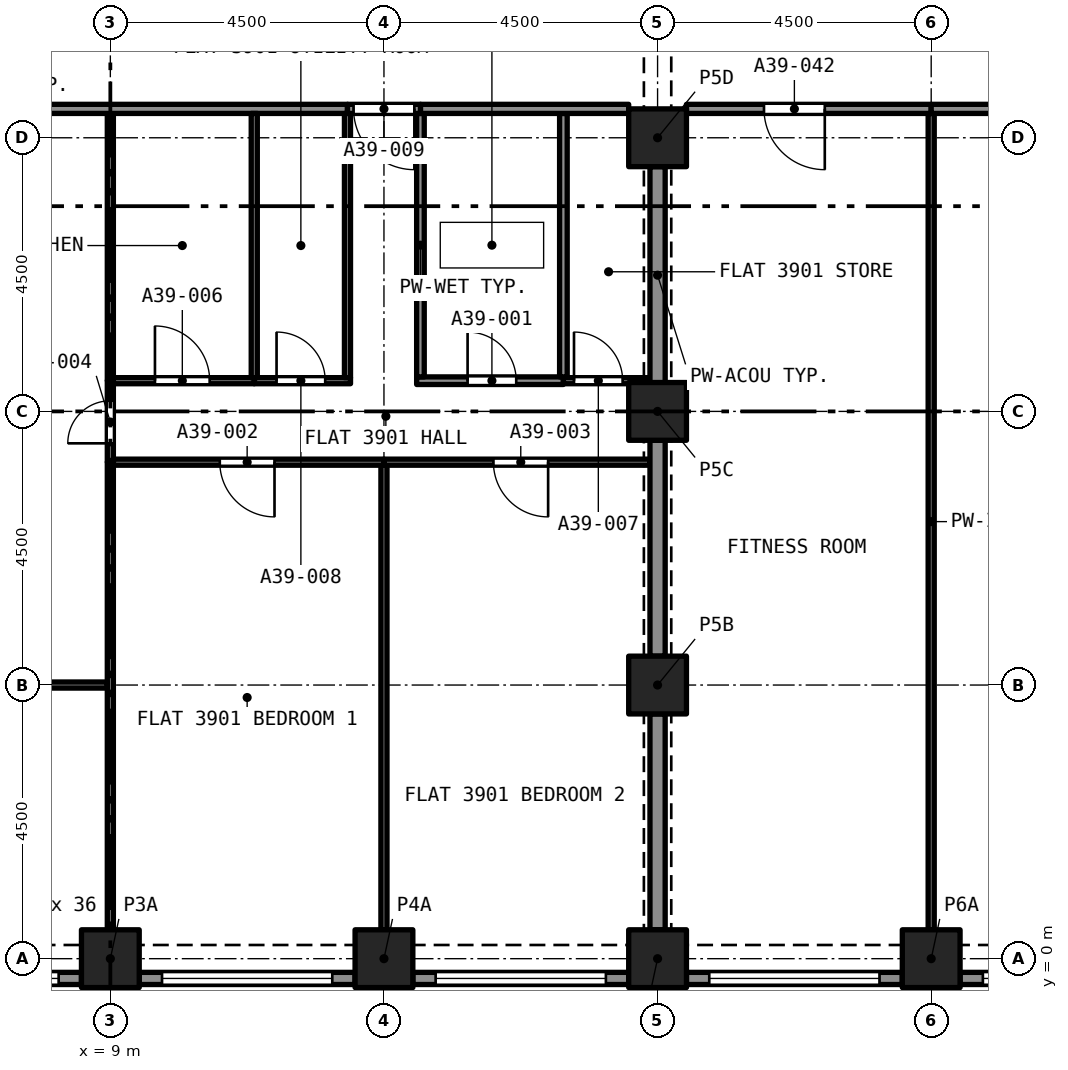
"""IFC4 building model, lengths in metres.
Left out: names, types, materials, properties, quantities, classifications, styles, units other than length and angle.
Written with IfcOpenShell. Run it as: python <this file> out.ifc"""

import sys

from ifc_helpers import new_model, si_unit, direction, frame, frame_2d, origin, origin_2d, place, context, subcontext, project, spatial, rectangle, extrude, element, fill, save


model = new_model("IFC4")
c1 = context("Model", 3, precision=1e-05, world=origin(), true_north=direction((0.0, 1.0)))
c2 = subcontext(c1, "Body", "Model", "MODEL_VIEW")
j1 = project(units=[si_unit("LENGTHUNIT", "METRE"), si_unit("PLANEANGLEUNIT", "RADIAN")], contexts=[c1])
p1 = place(None, origin())
s1 = spatial("IfcSite", under=j1, at=p1, CompositionType="ELEMENT")
p2 = place(p1, origin())
s2 = spatial("IfcBuilding", under=s1, at=p2, CompositionType="ELEMENT")
p3 = place(p2, frame((0.0, 0.0, 139.8)))
s3 = spatial("IfcBuildingStorey", under=s2, at=p3, CompositionType="ELEMENT", Elevation=139.8)
for number, where, z_axis, x_axis in (
    (1, (9.0, 0.0, 0.0), (0.0, 0.0, 1.0), (1.0, 0.0, 0.0)),
    (2, (13.5, 0.0, 0.0), (0.0, 0.0, 1.0), (1.0, 0.0, 0.0)),
    (3, (18.0, 0.0, 0.0), (0.0, 0.0, 1.0), (1.0, 0.0, 0.0)),
    (4, (22.5, 0.0, 0.0), (0.0, 0.0, 1.0), (1.0, 0.0, 0.0)),
    (5, (18.0, 4.5, 0.0), (0.0, 0.0, 1.0), (1.0, 0.0, 0.0)),
    (6, (18.0, 9.0, 0.0), (0.0, 0.0, 1.0), (1.0, 0.0, 0.0)),
    (7, (18.0, 13.5, 0.0), (0.0, 0.0, 1.0), (1.0, 0.0, 0.0)),
):
    element("IfcColumn", number, at=place(p3, frame(where, z_axis=z_axis, x_axis=x_axis)), inside=s3, PredefinedType="COLUMN", context=c2, shape_type="SweptSolid", body=[
        extrude(rectangle(XDim=0.95, YDim=0.95, at=origin_2d()), origin(), (0.0, 0.0, 1.0), 3.2),
    ])
p4 = place(p3, frame((8.525, -0.325, 0.0), z_axis=(0.0, 0.0, 1.0), x_axis=(-1.0, 0.0, 0.0)))
e8 = element("IfcWall", 8, at=p4, inside=s3, PredefinedType="SOLIDWALL", context=c2, shape_type="SweptSolid", body=[
    extrude(rectangle(XDim=3.55, YDim=0.2, at=frame_2d((1.775, 0.0))), origin(), (0.0, 0.0, 1.0), 3.2),
])
p5 = place(p4, frame((0.375, 0.0, 0.45)))
e9 = element("IfcOpeningElement", 9, at=p5, cuts=e8, PredefinedType="OPENING", context=c2, shape_type="SweptSolid", body=[
    extrude(rectangle(XDim=2.8, YDim=1.95, at=frame_2d((1.4, 0.975))), frame((0.0, 0.11, 0.0), z_axis=(0.0, -1.0, 0.0), x_axis=(1.0, 0.0, 0.0)), (0.0, 0.0, 1.0), 0.22),
])
p6 = place(p3, frame((13.025, -0.325, 0.0), z_axis=(0.0, 0.0, 1.0), x_axis=(-1.0, 0.0, 0.0)))
e10 = element("IfcWall", 10, at=p6, inside=s3, PredefinedType="SOLIDWALL", context=c2, shape_type="SweptSolid", body=[
    extrude(rectangle(XDim=3.55, YDim=0.2, at=frame_2d((1.775, 0.0))), origin(), (0.0, 0.0, 1.0), 3.2),
])
p7 = place(p6, frame((0.375, 0.0, 0.45)))
e11 = element("IfcOpeningElement", 11, at=p7, cuts=e10, PredefinedType="OPENING", context=c2, shape_type="SweptSolid", body=[
    extrude(rectangle(XDim=2.8, YDim=1.95, at=frame_2d((1.4, 0.975))), frame((0.0, 0.11, 0.0), z_axis=(0.0, -1.0, 0.0), x_axis=(1.0, 0.0, 0.0)), (0.0, 0.0, 1.0), 0.22),
])
p8 = place(p3, frame((17.525, -0.325, 0.0), z_axis=(0.0, 0.0, 1.0), x_axis=(-1.0, 0.0, 0.0)))
e12 = element("IfcWall", 12, at=p8, inside=s3, PredefinedType="SOLIDWALL", context=c2, shape_type="SweptSolid", body=[
    extrude(rectangle(XDim=3.55, YDim=0.2, at=frame_2d((1.775, 0.0))), origin(), (0.0, 0.0, 1.0), 3.2),
])
p9 = place(p8, frame((0.375, 0.0, 0.45)))
e13 = element("IfcOpeningElement", 13, at=p9, cuts=e12, PredefinedType="OPENING", context=c2, shape_type="SweptSolid", body=[
    extrude(rectangle(XDim=2.8, YDim=1.95, at=frame_2d((1.4, 0.975))), frame((0.0, 0.11, 0.0), z_axis=(0.0, -1.0, 0.0), x_axis=(1.0, 0.0, 0.0)), (0.0, 0.0, 1.0), 0.22),
])
p10 = place(p3, frame((22.025, -0.325, 0.0), z_axis=(0.0, 0.0, 1.0), x_axis=(-1.0, 0.0, 0.0)))
e14 = element("IfcWall", 14, at=p10, inside=s3, PredefinedType="SOLIDWALL", context=c2, shape_type="SweptSolid", body=[
    extrude(rectangle(XDim=3.55, YDim=0.2, at=frame_2d((1.775, 0.0))), origin(), (0.0, 0.0, 1.0), 3.2),
])
p11 = place(p10, frame((0.375, 0.0, 0.45)))
e15 = element("IfcOpeningElement", 15, at=p11, cuts=e14, PredefinedType="OPENING", context=c2, shape_type="SweptSolid", body=[
    extrude(rectangle(XDim=2.8, YDim=1.95, at=frame_2d((1.4, 0.975))), frame((0.0, 0.11, 0.0), z_axis=(0.0, -1.0, 0.0), x_axis=(1.0, 0.0, 0.0)), (0.0, 0.0, 1.0), 0.22),
])
p12 = place(p3, frame((26.525, -0.325, 0.0), z_axis=(0.0, 0.0, 1.0), x_axis=(-1.0, 0.0, 0.0)))
e16 = element("IfcWall", 16, at=p12, inside=s3, PredefinedType="SOLIDWALL", context=c2, shape_type="SweptSolid", body=[
    extrude(rectangle(XDim=3.55, YDim=0.2, at=frame_2d((1.775, 0.0))), origin(), (0.0, 0.0, 1.0), 3.2),
])
p13 = place(p12, frame((0.375, 0.0, 0.45)))
e17 = element("IfcOpeningElement", 17, at=p13, cuts=e16, PredefinedType="OPENING", context=c2, shape_type="SweptSolid", body=[
    extrude(rectangle(XDim=2.8, YDim=1.95, at=frame_2d((1.4, 0.975))), frame((0.0, 0.11, 0.0), z_axis=(0.0, -1.0, 0.0), x_axis=(1.0, 0.0, 0.0)), (0.0, 0.0, 1.0), 0.22),
])
p14 = place(p3, frame((14.038, 9.505, 0.0), z_axis=(0.0, 0.0, 1.0), x_axis=(1.0, 0.0, 0.0)))
e18 = element("IfcWall", 18, at=p14, inside=s3, PredefinedType="PARTITIONING", context=c2, shape_type="SweptSolid", body=[
    extrude(rectangle(XDim=2.414, YDim=0.125, at=frame_2d((1.207, 0.0))), origin(), (0.0, 0.0, 1.0), 2.9),
])
p15 = place(p14, frame((0.838, 0.0, 0.0)))
e19 = element("IfcOpeningElement", 19, at=p15, cuts=e18, PredefinedType="OPENING", context=c2, shape_type="SweptSolid", body=[
    extrude(rectangle(XDim=0.8, YDim=2.1, at=frame_2d((0.4, 1.05))), frame((0.0, 0.073, 0.0), z_axis=(0.0, -1.0, 0.0), x_axis=(1.0, 0.0, 0.0)), (0.0, 0.0, 1.0), 0.145),
])
for number, where, z_axis, x_axis in (
    (20, (14.1, 9.567, 0.0), (0.0, 0.0, 1.0), (0.0, 1.0, 0.0)),
    (21, (16.451, 9.567, 0.0), (0.0, 0.0, 1.0), (0.0, 1.0, 0.0)),
):
    element("IfcWall", number, at=place(p3, frame(where, z_axis=z_axis, x_axis=x_axis)), inside=s3, PredefinedType="PARTITIONING", context=c2, shape_type="SweptSolid", body=[
        extrude(rectangle(XDim=4.333, YDim=0.125, at=frame_2d((2.166, 0.0))), origin(), (0.0, 0.0, 1.0), 2.9),
    ])
p16 = place(p3, frame((14.1, 13.975, 0.0), z_axis=(0.0, 0.0, 1.0), x_axis=(1.0, 0.0, 0.0)))
e22 = element("IfcWall", 22, at=p16, inside=s3, PredefinedType="PARTITIONING", context=c2, shape_type="SweptSolid", body=[
    extrude(rectangle(XDim=3.425, YDim=0.15, at=frame_2d((1.712, 0.0))), origin(), (0.0, 0.0, 1.0), 2.9),
])
p17 = place(p3, frame((13.5, 0.475, 0.0), z_axis=(0.0, 0.0, 1.0), x_axis=(0.0, 1.0, 0.0)))
e23 = element("IfcWall", 23, at=p17, inside=s3, PredefinedType="PARTITIONING", context=c2, shape_type="SweptSolid", body=[
    extrude(rectangle(XDim=7.64, YDim=0.1, at=frame_2d((3.82, 0.0))), origin(), (0.0, 0.0, 1.0), 2.9),
])
p18 = place(p3, frame((13.5, 8.165, 0.0), z_axis=(0.0, 0.0, 1.0), x_axis=(-1.0, 0.0, 0.0)))
e24 = element("IfcWall", 24, at=p18, inside=s3, PredefinedType="PARTITIONING", context=c2, shape_type="SweptSolid", body=[
    extrude(rectangle(XDim=4.45, YDim=0.1, at=frame_2d((2.225, 0.0))), origin(), (0.0, 0.0, 1.0), 2.9),
])
p19 = place(p18, frame((1.8, 0.0, 0.0)))
e25 = element("IfcOpeningElement", 25, at=p19, cuts=e24, PredefinedType="OPENING", context=c2, shape_type="SweptSolid", body=[
    extrude(rectangle(XDim=0.9, YDim=2.1, at=frame_2d((0.45, 1.05))), frame((0.0, 0.06, 0.0), z_axis=(0.0, -1.0, 0.0), x_axis=(1.0, 0.0, 0.0)), (0.0, 0.0, 1.0), 0.12),
])
p20 = place(p3, frame((9.0, 0.475, 0.0), z_axis=(0.0, 0.0, 1.0), x_axis=(0.0, 1.0, 0.0)))
e26 = element("IfcWall", 26, at=p20, inside=s3, PredefinedType="PARTITIONING", context=c2, shape_type="SweptSolid", body=[
    extrude(rectangle(XDim=7.69, YDim=0.1, at=frame_2d((3.845, 0.0))), origin(), (0.0, 0.0, 1.0), 2.9),
])
p21 = place(p3, frame((17.875, 8.165, 0.0), z_axis=(0.0, 0.0, 1.0), x_axis=(-1.0, 0.0, 0.0)))
e27 = element("IfcWall", 27, at=p21, inside=s3, PredefinedType="PARTITIONING", context=c2, shape_type="SweptSolid", body=[
    extrude(rectangle(XDim=4.375, YDim=0.1, at=frame_2d((2.188, 0.0))), origin(), (0.0, 0.0, 1.0), 2.9),
])
p22 = place(p21, frame((1.675, 0.0, 0.0)))
e28 = element("IfcOpeningElement", 28, at=p22, cuts=e27, PredefinedType="OPENING", context=c2, shape_type="SweptSolid", body=[
    extrude(rectangle(XDim=0.9, YDim=2.1, at=frame_2d((0.45, 1.05))), frame((0.0, 0.06, 0.0), z_axis=(0.0, -1.0, 0.0), x_axis=(1.0, 0.0, 0.0)), (0.0, 0.0, 1.0), 0.12),
])
for number, where, z_axis, x_axis in (
    (29, (18.0, 4.975, 0.0), (0.0, 0.0, 1.0), (0.0, 1.0, 0.0)),
    (30, (18.0, 0.475, 0.0), (0.0, 0.0, 1.0), (0.0, 1.0, 0.0)),
):
    element("IfcWall", number, at=place(p3, frame(where, z_axis=z_axis, x_axis=x_axis)), inside=s3, PredefinedType="PARTITIONING", context=c2, shape_type="SweptSolid", body=[
        extrude(rectangle(XDim=3.55, YDim=0.25, at=frame_2d((1.775, 0.0))), origin(), (0.0, 0.0, 1.0), 2.38),
    ])
p23 = place(p3, frame((9.0, 8.165, 0.0), z_axis=(0.0, 0.0, 1.0), x_axis=(0.0, 1.0, 0.0)))
e31 = element("IfcWall", 31, at=p23, inside=s3, PredefinedType="PARTITIONING", context=c2, shape_type="SweptSolid", body=[
    extrude(rectangle(XDim=1.34, YDim=0.1, at=frame_2d((0.67, 0.0))), origin(), (0.0, 0.0, 1.0), 2.9),
])
p24 = place(p23, frame((0.31, 0.0, 0.0)))
e32 = element("IfcOpeningElement", 32, at=p24, cuts=e31, PredefinedType="OPENING", context=c2, shape_type="SweptSolid", body=[
    extrude(rectangle(XDim=0.7, YDim=2.1, at=frame_2d((0.35, 1.05))), frame((0.0, 0.06, 0.0), z_axis=(0.0, -1.0, 0.0), x_axis=(1.0, 0.0, 0.0)), (0.0, 0.0, 1.0), 0.12),
])
p25 = place(p3, frame((9.0, 9.505, 0.0), z_axis=(0.0, 0.0, 1.0), x_axis=(0.0, 1.0, 0.0)))
e33 = element("IfcWall", 33, at=p25, inside=s3, PredefinedType="PARTITIONING", context=c2, shape_type="SweptSolid", body=[
    extrude(rectangle(XDim=4.395, YDim=0.1, at=frame_2d((2.198, 0.0))), origin(), (0.0, 0.0, 1.0), 2.9),
])
p26 = place(p3, frame((0.514, 4.5, 0.0), z_axis=(0.0, 0.0, 1.0), x_axis=(1.0, 0.0, 0.0)))
e34 = element("IfcWall", 34, at=p26, inside=s3, PredefinedType="PARTITIONING", context=c2, shape_type="SweptSolid", body=[
    extrude(rectangle(XDim=8.436, YDim=0.1, at=frame_2d((4.218, 0.0))), origin(), (0.0, 0.0, 1.0), 2.9),
])
p27 = place(p26, frame((3.423, 0.0, 0.0)))
e35 = element("IfcOpeningElement", 35, at=p27, cuts=e34, PredefinedType="OPENING", context=c2, shape_type="SweptSolid", body=[
    extrude(rectangle(XDim=1.6, YDim=2.1, at=frame_2d((0.8, 1.05))), frame((0.0, 0.06, 0.0), z_axis=(0.0, -1.0, 0.0), x_axis=(1.0, 0.0, 0.0)), (0.0, 0.0, 1.0), 0.12),
])
p28 = place(p3, frame((0.475, 13.975, 0.0), z_axis=(0.0, 0.0, 1.0), x_axis=(1.0, 0.0, 0.0)))
e36 = element("IfcWall", 36, at=p28, inside=s3, PredefinedType="PARTITIONING", context=c2, shape_type="SweptSolid", body=[
    extrude(rectangle(XDim=12.425, YDim=0.15, at=frame_2d((6.212, 0.0))), origin(), (0.0, 0.0, 1.0), 2.9),
])
p29 = place(p3, frame((9.05, 9.505, 0.0), z_axis=(0.0, 0.0, 1.0), x_axis=(1.0, 0.0, 0.0)))
e37 = element("IfcWall", 37, at=p29, inside=s3, PredefinedType="PARTITIONING", context=c2, shape_type="SweptSolid", body=[
    extrude(rectangle(XDim=2.317, YDim=0.1, at=frame_2d((1.159, 0.0))), origin(), (0.0, 0.0, 1.0), 2.9),
])
p30 = place(p29, frame((0.684, 0.0, 0.0)))
e38 = element("IfcOpeningElement", 38, at=p30, cuts=e37, PredefinedType="OPENING", context=c2, shape_type="SweptSolid", body=[
    extrude(rectangle(XDim=0.9, YDim=2.1, at=frame_2d((0.45, 1.05))), frame((0.0, 0.06, 0.0), z_axis=(0.0, -1.0, 0.0), x_axis=(1.0, 0.0, 0.0)), (0.0, 0.0, 1.0), 0.12),
])
p31 = place(p3, frame((16.451, 9.505, 0.0), z_axis=(0.0, 0.0, 1.0), x_axis=(1.0, 0.0, 0.0)))
e39 = element("IfcWall", 39, at=p31, inside=s3, PredefinedType="PARTITIONING", context=c2, shape_type="SweptSolid", body=[
    extrude(rectangle(XDim=1.424, YDim=0.1, at=frame_2d((0.712, 0.0))), origin(), (0.0, 0.0, 1.0), 2.9),
])
p32 = place(p31, frame((0.175, 0.0, 0.0)))
e40 = element("IfcOpeningElement", 40, at=p32, cuts=e39, PredefinedType="OPENING", context=c2, shape_type="SweptSolid", body=[
    extrude(rectangle(XDim=0.8, YDim=2.1, at=frame_2d((0.4, 1.05))), frame((0.0, 0.06, 0.0), z_axis=(0.0, -1.0, 0.0), x_axis=(1.0, 0.0, 0.0)), (0.0, 0.0, 1.0), 0.12),
])
p33 = place(p3, frame((11.367, 9.505, 0.0), z_axis=(0.0, 0.0, 1.0), x_axis=(1.0, 0.0, 0.0)))
e41 = element("IfcWall", 41, at=p33, inside=s3, PredefinedType="PARTITIONING", context=c2, shape_type="SweptSolid", body=[
    extrude(rectangle(XDim=1.583, YDim=0.1, at=frame_2d((0.791, 0.0))), origin(), (0.0, 0.0, 1.0), 2.9),
])
p34 = place(p33, frame((0.366, 0.0, 0.0)))
e42 = element("IfcOpeningElement", 42, at=p34, cuts=e41, PredefinedType="OPENING", context=c2, shape_type="SweptSolid", body=[
    extrude(rectangle(XDim=0.8, YDim=2.1, at=frame_2d((0.4, 1.05))), frame((0.0, 0.06, 0.0), z_axis=(0.0, -1.0, 0.0), x_axis=(1.0, 0.0, 0.0)), (0.0, 0.0, 1.0), 0.12),
])
p35 = place(p3, frame((12.9, 9.555, 0.0), z_axis=(0.0, 0.0, 1.0), x_axis=(0.0, 1.0, 0.0)))
e43 = element("IfcWall", 43, at=p35, inside=s3, PredefinedType="PARTITIONING", context=c2, shape_type="SweptSolid", body=[
    extrude(rectangle(XDim=4.345, YDim=0.1, at=frame_2d((2.172, 0.0))), origin(), (0.0, 0.0, 1.0), 2.9),
])
p36 = place(p3, frame((14.1, 13.975, 0.0), z_axis=(0.0, 0.0, 1.0), x_axis=(-1.0, 0.0, 0.0)))
e44 = element("IfcWall", 44, at=p36, inside=s3, PredefinedType="PARTITIONING", context=c2, shape_type="SweptSolid", body=[
    extrude(rectangle(XDim=1.2, YDim=0.15, at=frame_2d((0.6, 0.0))), origin(), (0.0, 0.0, 1.0), 2.9),
])
p37 = place(p36, frame((0.1, 0.0, 0.0)))
e45 = element("IfcOpeningElement", 45, at=p37, cuts=e44, PredefinedType="OPENING", context=c2, shape_type="SweptSolid", body=[
    extrude(rectangle(XDim=1.0, YDim=2.1, at=frame_2d((0.5, 1.05))), frame((0.0, 0.085, 0.0), z_axis=(0.0, -1.0, 0.0), x_axis=(1.0, 0.0, 0.0)), (0.0, 0.0, 1.0), 0.17),
])
p38 = place(p3, frame((11.367, 9.555, 0.0), z_axis=(0.0, 0.0, 1.0), x_axis=(0.0, 1.0, 0.0)))
e46 = element("IfcWall", 46, at=p38, inside=s3, PredefinedType="PARTITIONING", context=c2, shape_type="SweptSolid", body=[
    extrude(rectangle(XDim=4.345, YDim=0.1, at=frame_2d((2.172, 0.0))), origin(), (0.0, 0.0, 1.0), 2.9),
])
p39 = place(p3, frame((18.0, 9.455, 0.0), z_axis=(0.0, 0.0, 1.0), x_axis=(0.0, 1.0, 0.0)))
e47 = element("IfcWall", 47, at=p39, inside=s3, PredefinedType="PARTITIONING", context=c2, shape_type="SweptSolid", body=[
    extrude(rectangle(XDim=3.57, YDim=0.25, at=frame_2d((1.785, 0.0))), origin(), (0.0, 0.0, 1.0), 2.38),
])
p40 = place(p3, frame((22.5, 0.475, 0.0), z_axis=(0.0, 0.0, 1.0), x_axis=(0.0, 1.0, 0.0)))
e48 = element("IfcWall", 48, at=p40, inside=s3, PredefinedType="PARTITIONING", context=c2, shape_type="SweptSolid", body=[
    extrude(rectangle(XDim=13.425, YDim=0.1, at=frame_2d((6.712, 0.0))), origin(), (0.0, 0.0, 1.0), 2.75),
])
p41 = place(p3, frame((22.5, 13.975, 0.0), z_axis=(0.0, 0.0, 1.0), x_axis=(-1.0, 0.0, 0.0)))
e49 = element("IfcWall", 49, at=p41, inside=s3, PredefinedType="PARTITIONING", context=c2, shape_type="SweptSolid", body=[
    extrude(rectangle(XDim=4.025, YDim=0.15, at=frame_2d((2.012, 0.0))), origin(), (0.0, 0.0, 1.0), 2.75),
])
p42 = place(p41, frame((1.75, 0.0, 0.0)))
e50 = element("IfcOpeningElement", 50, at=p42, cuts=e49, PredefinedType="OPENING", context=c2, shape_type="SweptSolid", body=[
    extrude(rectangle(XDim=1.0, YDim=2.1, at=frame_2d((0.5, 1.05))), frame((0.0, 0.085, 0.0), z_axis=(0.0, -1.0, 0.0), x_axis=(1.0, 0.0, 0.0)), (0.0, 0.0, 1.0), 0.17),
])
p43 = place(p3, frame((31.025, 13.975, 0.0), z_axis=(0.0, 0.0, 1.0), x_axis=(-1.0, 0.0, 0.0)))
e51 = element("IfcWall", 51, at=p43, inside=s3, PredefinedType="PARTITIONING", context=c2, shape_type="SweptSolid", body=[
    extrude(rectangle(XDim=8.525, YDim=0.15, at=frame_2d((4.262, 0.0))), origin(), (0.0, 0.0, 1.0), 2.75),
])
p44 = place(p43, frame((3.525, 0.0, 0.0)))
e52 = element("IfcOpeningElement", 52, at=p44, cuts=e51, PredefinedType="OPENING", context=c2, shape_type="SweptSolid", body=[
    extrude(rectangle(XDim=1.0, YDim=2.1, at=frame_2d((0.5, 1.05))), frame((0.0, 0.085, 0.0), z_axis=(0.0, -1.0, 0.0), x_axis=(1.0, 0.0, 0.0)), (0.0, 0.0, 1.0), 0.17),
])
p45 = place(p5, origin())
e53 = element("IfcWindow", 53, at=p45, inside=s3, PartitioningType="SINGLE_PANEL", PredefinedType="WINDOW", context=c2, shape_type="SweptSolid", body=[
    extrude(rectangle(XDim=2.8, YDim=1.95, at=frame_2d((1.4, 0.975))), frame((0.0, 0.03, 0.0), z_axis=(0.0, -1.0, 0.0), x_axis=(1.0, 0.0, 0.0)), (0.0, 0.0, 1.0), 0.06),
])
fill(e9, e53)
p46 = place(p7, origin())
e54 = element("IfcWindow", 54, at=p46, inside=s3, PartitioningType="SINGLE_PANEL", PredefinedType="WINDOW", context=c2, shape_type="SweptSolid", body=[
    extrude(rectangle(XDim=2.8, YDim=1.95, at=frame_2d((1.4, 0.975))), frame((0.0, 0.03, 0.0), z_axis=(0.0, -1.0, 0.0), x_axis=(1.0, 0.0, 0.0)), (0.0, 0.0, 1.0), 0.06),
])
fill(e11, e54)
p47 = place(p9, origin())
e55 = element("IfcWindow", 55, at=p47, inside=s3, PartitioningType="SINGLE_PANEL", PredefinedType="WINDOW", context=c2, shape_type="SweptSolid", body=[
    extrude(rectangle(XDim=2.8, YDim=1.95, at=frame_2d((1.4, 0.975))), frame((0.0, 0.03, 0.0), z_axis=(0.0, -1.0, 0.0), x_axis=(1.0, 0.0, 0.0)), (0.0, 0.0, 1.0), 0.06),
])
fill(e13, e55)
p48 = place(p11, origin())
e56 = element("IfcWindow", 56, at=p48, inside=s3, PartitioningType="SINGLE_PANEL", PredefinedType="WINDOW", context=c2, shape_type="SweptSolid", body=[
    extrude(rectangle(XDim=2.8, YDim=1.95, at=frame_2d((1.4, 0.975))), frame((0.0, 0.03, 0.0), z_axis=(0.0, -1.0, 0.0), x_axis=(1.0, 0.0, 0.0)), (0.0, 0.0, 1.0), 0.06),
])
fill(e15, e56)
p49 = place(p13, origin())
e57 = element("IfcWindow", 57, at=p49, inside=s3, PartitioningType="SINGLE_PANEL", PredefinedType="WINDOW", context=c2, shape_type="SweptSolid", body=[
    extrude(rectangle(XDim=2.8, YDim=1.95, at=frame_2d((1.4, 0.975))), frame((0.0, 0.03, 0.0), z_axis=(0.0, -1.0, 0.0), x_axis=(1.0, 0.0, 0.0)), (0.0, 0.0, 1.0), 0.06),
])
fill(e17, e57)
p50 = place(p15, origin())
e58 = element("IfcDoor", 58, at=p50, inside=s3, OperationType="SINGLE_SWING_RIGHT", PredefinedType="DOOR", context=c2, shape_type="SweptSolid", body=[
    extrude(rectangle(XDim=0.8, YDim=2.1, at=frame_2d((0.4, 1.05))), frame((0.0, 0.025, 0.0), z_axis=(0.0, -1.0, 0.0), x_axis=(1.0, 0.0, 0.0)), (0.0, 0.0, 1.0), 0.05),
])
fill(e19, e58)
p51 = place(p19, origin())
e59 = element("IfcDoor", 59, at=p51, inside=s3, OperationType="SINGLE_SWING_RIGHT", PredefinedType="DOOR", context=c2, shape_type="SweptSolid", body=[
    extrude(rectangle(XDim=0.9, YDim=2.1, at=frame_2d((0.45, 1.05))), frame((0.0, 0.025, 0.0), z_axis=(0.0, -1.0, 0.0), x_axis=(1.0, 0.0, 0.0)), (0.0, 0.0, 1.0), 0.05),
])
fill(e25, e59)
p52 = place(p22, origin())
e60 = element("IfcDoor", 60, at=p52, inside=s3, OperationType="SINGLE_SWING_LEFT", PredefinedType="DOOR", context=c2, shape_type="SweptSolid", body=[
    extrude(rectangle(XDim=0.9, YDim=2.1, at=frame_2d((0.45, 1.05))), frame((0.0, 0.025, 0.0), z_axis=(0.0, -1.0, 0.0), x_axis=(1.0, 0.0, 0.0)), (0.0, 0.0, 1.0), 0.05),
])
fill(e28, e60)
p53 = place(p24, origin())
e61 = element("IfcDoor", 61, at=p53, inside=s3, OperationType="SINGLE_SWING_LEFT", PredefinedType="DOOR", context=c2, shape_type="SweptSolid", body=[
    extrude(rectangle(XDim=0.7, YDim=2.1, at=frame_2d((0.35, 1.05))), frame((0.0, 0.025, 0.0), z_axis=(0.0, -1.0, 0.0), x_axis=(1.0, 0.0, 0.0)), (0.0, 0.0, 1.0), 0.05),
])
fill(e32, e61)
p54 = place(p30, origin())
e62 = element("IfcDoor", 62, at=p54, inside=s3, OperationType="SINGLE_SWING_LEFT", PredefinedType="DOOR", context=c2, shape_type="SweptSolid", body=[
    extrude(rectangle(XDim=0.9, YDim=2.1, at=frame_2d((0.45, 1.05))), frame((0.0, 0.025, 0.0), z_axis=(0.0, -1.0, 0.0), x_axis=(1.0, 0.0, 0.0)), (0.0, 0.0, 1.0), 0.05),
])
fill(e38, e62)
p55 = place(p32, origin())
e63 = element("IfcDoor", 63, at=p55, inside=s3, OperationType="SINGLE_SWING_LEFT", PredefinedType="DOOR", context=c2, shape_type="SweptSolid", body=[
    extrude(rectangle(XDim=0.8, YDim=2.1, at=frame_2d((0.4, 1.05))), frame((0.0, 0.025, 0.0), z_axis=(0.0, -1.0, 0.0), x_axis=(1.0, 0.0, 0.0)), (0.0, 0.0, 1.0), 0.05),
])
fill(e40, e63)
p56 = place(p34, origin())
e64 = element("IfcDoor", 64, at=p56, inside=s3, OperationType="SINGLE_SWING_LEFT", PredefinedType="DOOR", context=c2, shape_type="SweptSolid", body=[
    extrude(rectangle(XDim=0.8, YDim=2.1, at=frame_2d((0.4, 1.05))), frame((0.0, 0.025, 0.0), z_axis=(0.0, -1.0, 0.0), x_axis=(1.0, 0.0, 0.0)), (0.0, 0.0, 1.0), 0.05),
])
fill(e42, e64)
p57 = place(p37, origin())
e65 = element("IfcDoor", 65, at=p57, inside=s3, OperationType="SINGLE_SWING_RIGHT", PredefinedType="DOOR", context=c2, shape_type="SweptSolid", body=[
    extrude(rectangle(XDim=1.0, YDim=2.1, at=frame_2d((0.5, 1.05))), frame((0.0, 0.025, 0.0), z_axis=(0.0, -1.0, 0.0), x_axis=(1.0, 0.0, 0.0)), (0.0, 0.0, 1.0), 0.05),
])
fill(e45, e65)
p58 = place(p42, origin())
e66 = element("IfcDoor", 66, at=p58, inside=s3, OperationType="SINGLE_SWING_RIGHT", PredefinedType="DOOR", context=c2, shape_type="SweptSolid", body=[
    extrude(rectangle(XDim=1.0, YDim=2.1, at=frame_2d((0.5, 1.05))), frame((0.0, 0.025, 0.0), z_axis=(0.0, -1.0, 0.0), x_axis=(1.0, 0.0, 0.0)), (0.0, 0.0, 1.0), 0.05),
])
fill(e50, e66)
save(model, sys.argv[1])
